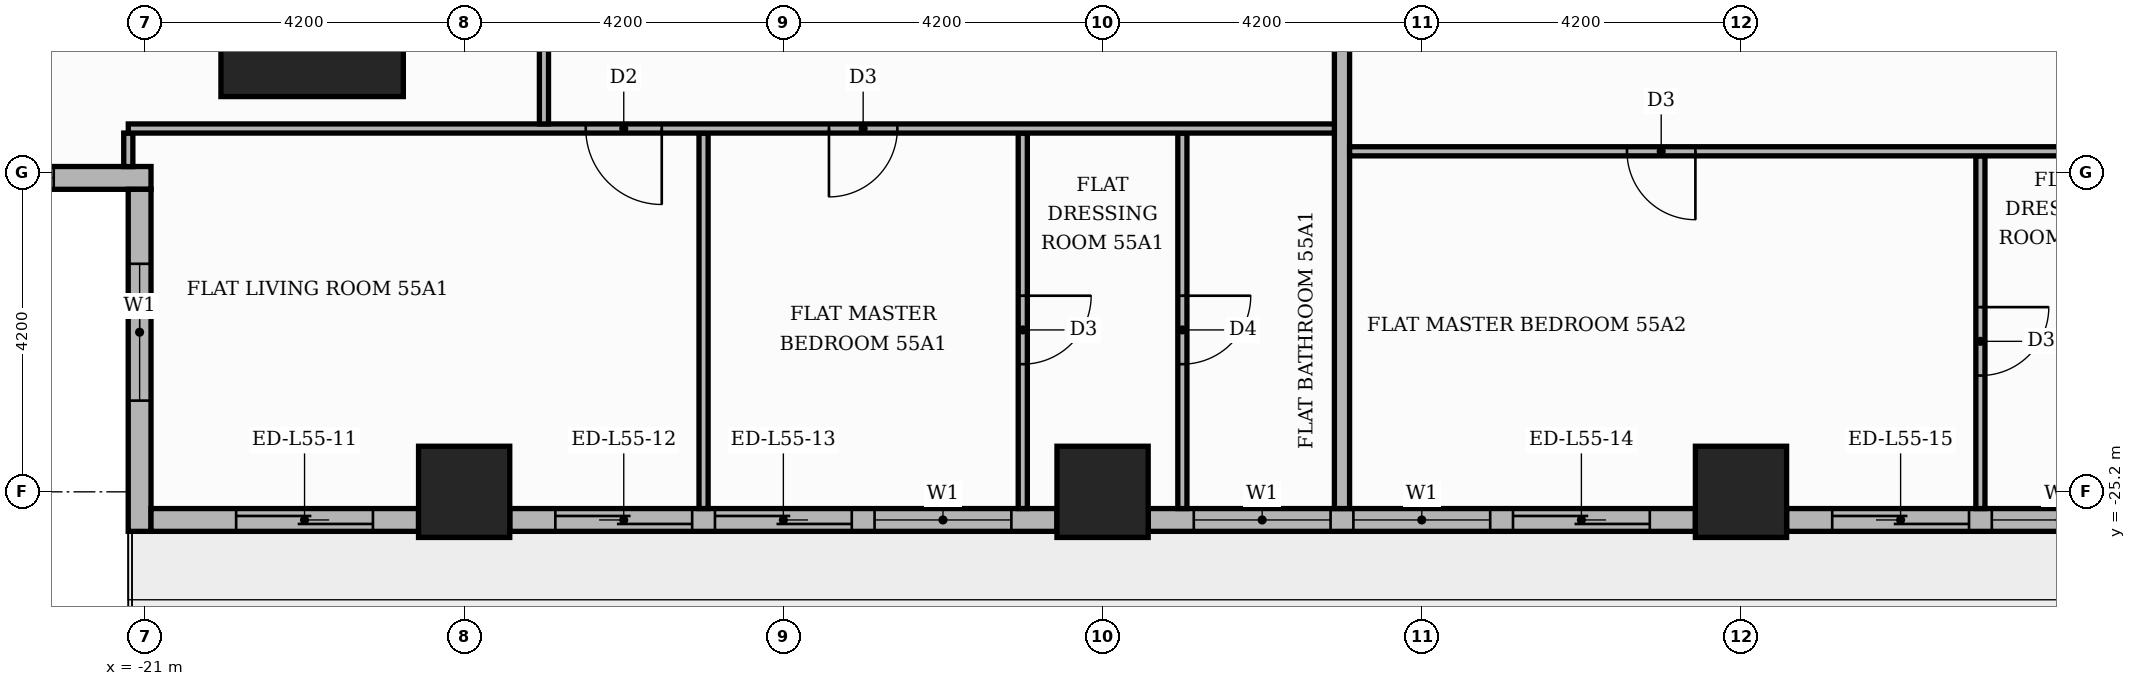
"""IFC4 building model, lengths in metres.
Left out: names, types, materials, properties, quantities, classifications, styles, units other than length and angle.
Written with IfcOpenShell. Run it as: python <this file> out.ifc"""

import sys

from ifc_helpers import new_model, si_unit, direction, frame, frame_2d, origin, origin_2d, place, context, subcontext, project, spatial, rectangle, extrude, element, fill, save


model = new_model("IFC4")
c1 = context("Model", 3, precision=1e-05, world=origin(), true_north=direction((0.0, 1.0)))
c2 = subcontext(c1, "Body", "Model", "MODEL_VIEW")
j1 = project(units=[si_unit("LENGTHUNIT", "METRE"), si_unit("PLANEANGLEUNIT", "RADIAN")], contexts=[c1])
p1 = place(None, origin())
s1 = spatial("IfcSite", under=j1, at=p1, CompositionType="ELEMENT")
p2 = place(p1, origin())
s2 = spatial("IfcBuilding", under=s1, at=p2, CompositionType="ELEMENT")
p3 = place(p2, frame((0.0, 0.0, 231.3)))
s3 = spatial("IfcBuildingStorey", under=s2, at=p3, CompositionType="ELEMENT", Elevation=231.3)
p4 = place(p3, frame((-18.8, -18.8, 0.0), z_axis=(0.0, 0.0, 1.0), x_axis=(1.0, 0.0, 0.0)))
e1 = element("IfcColumn", 1, at=p4, inside=s3, PredefinedType="COLUMN", context=c2, shape_type="SweptSolid", body=[
    extrude(rectangle(XDim=2.4, YDim=2.4, at=origin_2d()), origin(), (0.0, 0.0, 1.0), 3.9),
])
for number, where, z_axis, x_axis in (
    (2, (0.0, -25.2, 0.0), (0.0, 0.0, 1.0), (1.0, 0.0, 0.0)),
    (3, (-8.4, -25.2, 0.0), (0.0, 0.0, 1.0), (1.0, 0.0, 0.0)),
    (4, (-16.8, -25.2, 0.0), (0.0, 0.0, 1.0), (1.0, 0.0, 0.0)),
):
    element("IfcColumn", number, at=place(p3, frame(where, z_axis=z_axis, x_axis=x_axis)), inside=s3, PredefinedType="COLUMN", context=c2, shape_type="SweptSolid", body=[
        extrude(rectangle(XDim=1.2, YDim=1.2, at=origin_2d()), origin(), (0.0, 0.0, 1.0), 3.9),
    ])
p5 = place(p3, frame((-25.42, -21.07, 0.0), z_axis=(0.0, 0.0, 1.0), x_axis=(1.0, 0.0, 0.0)))
e5 = element("IfcWall", 5, at=p5, inside=s3, PredefinedType="STANDARD", context=c2, shape_type="SweptSolid", body=[
    extrude(rectangle(XDim=4.5, YDim=0.3, at=frame_2d((2.25, 0.0))), origin(), (0.0, 0.0, 1.0), 3.4),
])
p6 = place(p5, frame((1.42, 0.0, 0.9)))
e6 = element("IfcOpeningElement", 6, at=p6, cuts=e5, PredefinedType="OPENING", context=c2, shape_type="SweptSolid", body=[
    extrude(rectangle(XDim=1.8, YDim=2.1, at=frame_2d((0.9, 1.05))), frame((0.0, 0.16, 0.0), z_axis=(0.0, -1.0, 0.0), x_axis=(1.0, 0.0, 0.0)), (0.0, 0.0, 1.0), 0.32),
])
p7 = place(p3, frame((-21.07, -21.22, 0.0), z_axis=(0.0, 0.0, 1.0), x_axis=(0.0, -1.0, 0.0)))
e7 = element("IfcWall", 7, at=p7, inside=s3, PredefinedType="STANDARD", context=c2, shape_type="SweptSolid", body=[
    extrude(rectangle(XDim=4.5, YDim=0.3, at=frame_2d((2.25, 0.0))), origin(), (0.0, 0.0, 1.0), 3.4),
])
p8 = place(p7, frame((0.98, 0.0, 0.9)))
e8 = element("IfcOpeningElement", 8, at=p8, cuts=e7, PredefinedType="OPENING", context=c2, shape_type="SweptSolid", body=[
    extrude(rectangle(XDim=1.8, YDim=2.1, at=frame_2d((0.9, 1.05))), frame((0.0, 0.16, 0.0), z_axis=(0.0, -1.0, 0.0), x_axis=(1.0, 0.0, 0.0)), (0.0, 0.0, 1.0), 0.32),
])
p9 = place(p3, frame((-20.92, -25.57, 0.0), z_axis=(0.0, 0.0, 1.0), x_axis=(1.0, 0.0, 0.0)))
e9 = element("IfcWall", 9, at=p9, inside=s3, PredefinedType="STANDARD", context=c2, shape_type="SweptSolid", body=[
    extrude(rectangle(XDim=3.52, YDim=0.3, at=frame_2d((1.76, 0.0))), origin(), (0.0, 0.0, 1.0), 3.4),
])
p10 = place(p9, frame((1.12, 0.0, 0.0)))
e10 = element("IfcOpeningElement", 10, at=p10, cuts=e9, PredefinedType="OPENING", context=c2, shape_type="SweptSolid", body=[
    extrude(rectangle(XDim=1.8, YDim=2.4, at=frame_2d((0.9, 1.2))), frame((0.0, 0.16, 0.0), z_axis=(0.0, -1.0, 0.0), x_axis=(1.0, 0.0, 0.0)), (0.0, 0.0, 1.0), 0.32),
])
p11 = place(p3, frame((-16.2, -25.57, 0.0), z_axis=(0.0, 0.0, 1.0), x_axis=(1.0, 0.0, 0.0)))
e11 = element("IfcWall", 11, at=p11, inside=s3, PredefinedType="STANDARD", context=c2, shape_type="SweptSolid", body=[
    extrude(rectangle(XDim=7.2, YDim=0.3, at=frame_2d((3.6, 0.0))), origin(), (0.0, 0.0, 1.0), 3.4),
])
p12 = place(p11, frame((0.6, 0.0, 0.0)))
e12 = element("IfcOpeningElement", 12, at=p12, cuts=e11, PredefinedType="OPENING", context=c2, shape_type="SweptSolid", body=[
    extrude(rectangle(XDim=1.8, YDim=2.4, at=frame_2d((0.9, 1.2))), frame((0.0, 0.16, 0.0), z_axis=(0.0, -1.0, 0.0), x_axis=(1.0, 0.0, 0.0)), (0.0, 0.0, 1.0), 0.32),
])
p13 = place(p11, frame((2.7, 0.0, 0.0)))
e13 = element("IfcOpeningElement", 13, at=p13, cuts=e11, PredefinedType="OPENING", context=c2, shape_type="SweptSolid", body=[
    extrude(rectangle(XDim=1.8, YDim=2.4, at=frame_2d((0.9, 1.2))), frame((0.0, 0.16, 0.0), z_axis=(0.0, -1.0, 0.0), x_axis=(1.0, 0.0, 0.0)), (0.0, 0.0, 1.0), 0.32),
])
p14 = place(p11, frame((4.8, 0.0, 0.9)))
e14 = element("IfcOpeningElement", 14, at=p14, cuts=e11, PredefinedType="OPENING", context=c2, shape_type="SweptSolid", body=[
    extrude(rectangle(XDim=1.8, YDim=2.1, at=frame_2d((0.9, 1.05))), frame((0.0, 0.16, 0.0), z_axis=(0.0, -1.0, 0.0), x_axis=(1.0, 0.0, 0.0)), (0.0, 0.0, 1.0), 0.32),
])
p15 = place(p3, frame((-7.8, -25.57, 0.0), z_axis=(0.0, 0.0, 1.0), x_axis=(1.0, 0.0, 0.0)))
e15 = element("IfcWall", 15, at=p15, inside=s3, PredefinedType="STANDARD", context=c2, shape_type="SweptSolid", body=[
    extrude(rectangle(XDim=7.2, YDim=0.3, at=frame_2d((3.6, 0.0))), origin(), (0.0, 0.0, 1.0), 3.4),
])
p16 = place(p15, frame((0.6, 0.0, 0.9)))
e16 = element("IfcOpeningElement", 16, at=p16, cuts=e15, PredefinedType="OPENING", context=c2, shape_type="SweptSolid", body=[
    extrude(rectangle(XDim=1.8, YDim=2.1, at=frame_2d((0.9, 1.05))), frame((0.0, 0.16, 0.0), z_axis=(0.0, -1.0, 0.0), x_axis=(1.0, 0.0, 0.0)), (0.0, 0.0, 1.0), 0.32),
])
p17 = place(p15, frame((2.7, 0.0, 0.9)))
e17 = element("IfcOpeningElement", 17, at=p17, cuts=e15, PredefinedType="OPENING", context=c2, shape_type="SweptSolid", body=[
    extrude(rectangle(XDim=1.8, YDim=2.1, at=frame_2d((0.9, 1.05))), frame((0.0, 0.16, 0.0), z_axis=(0.0, -1.0, 0.0), x_axis=(1.0, 0.0, 0.0)), (0.0, 0.0, 1.0), 0.32),
])
p18 = place(p15, frame((4.8, 0.0, 0.0)))
e18 = element("IfcOpeningElement", 18, at=p18, cuts=e15, PredefinedType="OPENING", context=c2, shape_type="SweptSolid", body=[
    extrude(rectangle(XDim=1.8, YDim=2.4, at=frame_2d((0.9, 1.2))), frame((0.0, 0.16, 0.0), z_axis=(0.0, -1.0, 0.0), x_axis=(1.0, 0.0, 0.0)), (0.0, 0.0, 1.0), 0.32),
])
p19 = place(p3, frame((0.6, -25.57, 0.0), z_axis=(0.0, 0.0, 1.0), x_axis=(1.0, 0.0, 0.0)))
e19 = element("IfcWall", 19, at=p19, inside=s3, PredefinedType="STANDARD", context=c2, shape_type="SweptSolid", body=[
    extrude(rectangle(XDim=7.2, YDim=0.3, at=frame_2d((3.6, 0.0))), origin(), (0.0, 0.0, 1.0), 3.4),
])
p20 = place(p19, frame((0.6, 0.0, 0.0)))
e20 = element("IfcOpeningElement", 20, at=p20, cuts=e19, PredefinedType="OPENING", context=c2, shape_type="SweptSolid", body=[
    extrude(rectangle(XDim=1.8, YDim=2.4, at=frame_2d((0.9, 1.2))), frame((0.0, 0.16, 0.0), z_axis=(0.0, -1.0, 0.0), x_axis=(1.0, 0.0, 0.0)), (0.0, 0.0, 1.0), 0.32),
])
p21 = place(p19, frame((2.7, 0.0, 0.9)))
e21 = element("IfcOpeningElement", 21, at=p21, cuts=e19, PredefinedType="OPENING", context=c2, shape_type="SweptSolid", body=[
    extrude(rectangle(XDim=1.8, YDim=2.1, at=frame_2d((0.9, 1.05))), frame((0.0, 0.16, 0.0), z_axis=(0.0, -1.0, 0.0), x_axis=(1.0, 0.0, 0.0)), (0.0, 0.0, 1.0), 0.32),
])
p22 = place(p19, frame((4.8, 0.0, 0.9)))
e22 = element("IfcOpeningElement", 22, at=p22, cuts=e19, PredefinedType="OPENING", context=c2, shape_type="SweptSolid", body=[
    extrude(rectangle(XDim=1.8, YDim=2.1, at=frame_2d((0.9, 1.05))), frame((0.0, 0.16, 0.0), z_axis=(0.0, -1.0, 0.0), x_axis=(1.0, 0.0, 0.0)), (0.0, 0.0, 1.0), 0.32),
])
p23 = place(p3, frame((-13.65, -25.42, 0.0), z_axis=(0.0, 0.0, 1.0), x_axis=(0.0, 1.0, 0.0)))
e23 = element("IfcWall", 23, at=p23, inside=s3, PredefinedType="PARTITIONING", context=c2, shape_type="SweptSolid", body=[
    extrude(rectangle(XDim=4.94, YDim=0.12, at=frame_2d((2.47, 0.0))), origin(), (0.0, 0.0, 1.0), 3.4),
])
p24 = place(p3, frame((-9.45, -25.42, 0.0), z_axis=(0.0, 0.0, 1.0), x_axis=(0.0, 1.0, 0.0)))
e24 = element("IfcWall", 24, at=p24, inside=s3, PredefinedType="PARTITIONING", context=c2, shape_type="SweptSolid", body=[
    extrude(rectangle(XDim=4.94, YDim=0.12, at=frame_2d((2.47, 0.0))), origin(), (0.0, 0.0, 1.0), 3.4),
])
p25 = place(p24, frame((1.9, 0.0, 0.0)))
e25 = element("IfcOpeningElement", 25, at=p25, cuts=e24, PredefinedType="OPENING", context=c2, shape_type="SweptSolid", body=[
    extrude(rectangle(XDim=0.9, YDim=2.1, at=frame_2d((0.45, 1.05))), frame((0.0, 0.07, 0.0), z_axis=(0.0, -1.0, 0.0), x_axis=(1.0, 0.0, 0.0)), (0.0, 0.0, 1.0), 0.14),
])
p26 = place(p3, frame((-7.35, -25.42, 0.0), z_axis=(0.0, 0.0, 1.0), x_axis=(0.0, 1.0, 0.0)))
e26 = element("IfcWall", 26, at=p26, inside=s3, PredefinedType="PARTITIONING", context=c2, shape_type="SweptSolid", body=[
    extrude(rectangle(XDim=4.94, YDim=0.12, at=frame_2d((2.47, 0.0))), origin(), (0.0, 0.0, 1.0), 3.4),
])
p27 = place(p26, frame((1.9, 0.0, 0.0)))
e27 = element("IfcOpeningElement", 27, at=p27, cuts=e26, PredefinedType="OPENING", context=c2, shape_type="SweptSolid", body=[
    extrude(rectangle(XDim=0.9, YDim=2.1, at=frame_2d((0.45, 1.05))), frame((0.0, 0.07, 0.0), z_axis=(0.0, -1.0, 0.0), x_axis=(1.0, 0.0, 0.0)), (0.0, 0.0, 1.0), 0.14),
])
p28 = place(p3, frame((-5.25, -25.42, 0.0), z_axis=(0.0, 0.0, 1.0), x_axis=(0.0, 1.0, 0.0)))
e28 = element("IfcWall", 28, at=p28, inside=s3, PredefinedType="PARTITIONING", context=c2, shape_type="SweptSolid", body=[
    extrude(rectangle(XDim=11.67, YDim=0.2, at=frame_2d((5.835, 0.0))), origin(), (0.0, 0.0, 1.0), 3.4),
])
p29 = place(p3, frame((3.15, -25.42, 0.0), z_axis=(0.0, 0.0, 1.0), x_axis=(0.0, 1.0, 0.0)))
e29 = element("IfcWall", 29, at=p29, inside=s3, PredefinedType="PARTITIONING", context=c2, shape_type="SweptSolid", body=[
    extrude(rectangle(XDim=4.64, YDim=0.12, at=frame_2d((2.32, 0.0))), origin(), (0.0, 0.0, 1.0), 3.4),
])
p30 = place(p29, frame((1.75, 0.0, 0.0)))
e30 = element("IfcOpeningElement", 30, at=p30, cuts=e29, PredefinedType="OPENING", context=c2, shape_type="SweptSolid", body=[
    extrude(rectangle(XDim=0.9, YDim=2.1, at=frame_2d((0.45, 1.05))), frame((0.0, 0.07, 0.0), z_axis=(0.0, -1.0, 0.0), x_axis=(1.0, 0.0, 0.0)), (0.0, 0.0, 1.0), 0.14),
])
p31 = place(p3, frame((-21.219, -20.921, 0.0), z_axis=(0.0, 0.0, 1.0), x_axis=(0.0, 1.0, 0.0)))
e31 = element("IfcWall", 31, at=p31, inside=s3, PredefinedType="PARTITIONING", context=c2, shape_type="SweptSolid", body=[
    extrude(rectangle(XDim=0.441, YDim=0.12, at=frame_2d((0.22, 0.0))), origin(), (0.0, 0.0, 1.0), 3.4),
])
p32 = place(p3, frame((-5.15, -20.72, 0.0), z_axis=(0.0, 0.0, 1.0), x_axis=(1.0, 0.0, 0.0)))
e32 = element("IfcWall", 32, at=p32, inside=s3, PredefinedType="PARTITIONING", context=c2, shape_type="SweptSolid", body=[
    extrude(rectangle(XDim=18.7, YDim=0.12, at=frame_2d((9.35, 0.0))), origin(), (0.0, 0.0, 1.0), 3.4),
])
p33 = place(p32, frame((3.65, 0.0, 0.0)))
e33 = element("IfcOpeningElement", 33, at=p33, cuts=e32, PredefinedType="OPENING", context=c2, shape_type="SweptSolid", body=[
    extrude(rectangle(XDim=0.9, YDim=2.1, at=frame_2d((0.45, 1.05))), frame((0.0, 0.07, 0.0), z_axis=(0.0, -1.0, 0.0), x_axis=(1.0, 0.0, 0.0)), (0.0, 0.0, 1.0), 0.14),
])
p34 = place(p32, frame((15.15, 0.0, 0.0)))
e34 = element("IfcOpeningElement", 34, at=p34, cuts=e32, PredefinedType="OPENING", context=c2, shape_type="SweptSolid", body=[
    extrude(rectangle(XDim=1.0, YDim=2.1, at=frame_2d((0.5, 1.05))), frame((0.0, 0.07, 0.0), z_axis=(0.0, -1.0, 0.0), x_axis=(1.0, 0.0, 0.0)), (0.0, 0.0, 1.0), 0.14),
])
p35 = place(p3, frame((-21.219, -20.42, 0.0), z_axis=(0.0, 0.0, 1.0), x_axis=(1.0, 0.0, 0.0)))
e35 = element("IfcWall", 35, at=p35, inside=s3, PredefinedType="PARTITIONING", context=c2, shape_type="SweptSolid", body=[
    extrude(rectangle(XDim=15.869, YDim=0.12, at=frame_2d((7.935, 0.0))), origin(), (0.0, 0.0, 1.0), 3.4),
])
p36 = place(p35, frame((6.019, 0.0, 0.0)))
e36 = element("IfcOpeningElement", 36, at=p36, cuts=e35, PredefinedType="OPENING", context=c2, shape_type="SweptSolid", body=[
    extrude(rectangle(XDim=1.0, YDim=2.1, at=frame_2d((0.5, 1.05))), frame((0.0, 0.07, 0.0), z_axis=(0.0, -1.0, 0.0), x_axis=(1.0, 0.0, 0.0)), (0.0, 0.0, 1.0), 0.14),
])
p37 = place(p35, frame((9.219, 0.0, 0.0)))
e37 = element("IfcOpeningElement", 37, at=p37, cuts=e35, PredefinedType="OPENING", context=c2, shape_type="SweptSolid", body=[
    extrude(rectangle(XDim=0.9, YDim=2.1, at=frame_2d((0.45, 1.05))), frame((0.0, 0.07, 0.0), z_axis=(0.0, -1.0, 0.0), x_axis=(1.0, 0.0, 0.0)), (0.0, 0.0, 1.0), 0.14),
])
p38 = place(p3, frame((-15.75, -20.36, 0.0), z_axis=(0.0, 0.0, 1.0), x_axis=(0.0, 1.0, 0.0)))
e38 = element("IfcWall", 38, at=p38, inside=s3, PredefinedType="PARTITIONING", context=c2, shape_type="SweptSolid", body=[
    extrude(rectangle(XDim=6.61, YDim=0.12, at=frame_2d((3.305, 0.0))), origin(), (0.0, 0.0, 1.0), 3.4),
])
p39 = place(p38, frame((2.825, 0.0, 0.0)))
e39 = element("IfcOpeningElement", 39, at=p39, cuts=e38, PredefinedType="OPENING", context=c2, shape_type="SweptSolid", body=[
    extrude(rectangle(XDim=1.0, YDim=2.1, at=frame_2d((0.5, 1.05))), frame((0.0, 0.07, 0.0), z_axis=(0.0, -1.0, 0.0), x_axis=(1.0, 0.0, 0.0)), (0.0, 0.0, 1.0), 0.14),
])
p40 = place(p6, origin())
e40 = element("IfcWindow", 40, at=p40, inside=s3, PartitioningType="SINGLE_PANEL", PredefinedType="WINDOW", context=c2, shape_type="SweptSolid", body=[
    extrude(rectangle(XDim=1.8, YDim=2.1, at=frame_2d((0.9, 1.05))), frame((0.0, 0.03, 0.0), z_axis=(0.0, -1.0, 0.0), x_axis=(1.0, 0.0, 0.0)), (0.0, 0.0, 1.0), 0.06),
])
fill(e6, e40)
p41 = place(p8, origin())
e41 = element("IfcWindow", 41, at=p41, inside=s3, PartitioningType="SINGLE_PANEL", PredefinedType="WINDOW", context=c2, shape_type="SweptSolid", body=[
    extrude(rectangle(XDim=1.8, YDim=2.1, at=frame_2d((0.9, 1.05))), frame((0.0, 0.03, 0.0), z_axis=(0.0, -1.0, 0.0), x_axis=(1.0, 0.0, 0.0)), (0.0, 0.0, 1.0), 0.06),
])
fill(e8, e41)
p42 = place(p10, origin())
e42 = element("IfcDoor", 42, at=p42, inside=s3, OperationType="SLIDING_TO_RIGHT", PredefinedType="DOOR", context=c2, shape_type="SweptSolid", body=[
    extrude(rectangle(XDim=1.8, YDim=2.4, at=frame_2d((0.9, 1.2))), frame((0.0, 0.025, 0.0), z_axis=(0.0, -1.0, 0.0), x_axis=(1.0, 0.0, 0.0)), (0.0, 0.0, 1.0), 0.05),
])
fill(e10, e42)
p43 = place(p12, origin())
e43 = element("IfcDoor", 43, at=p43, inside=s3, OperationType="SLIDING_TO_LEFT", PredefinedType="DOOR", context=c2, shape_type="SweptSolid", body=[
    extrude(rectangle(XDim=1.8, YDim=2.4, at=frame_2d((0.9, 1.2))), frame((0.0, 0.025, 0.0), z_axis=(0.0, -1.0, 0.0), x_axis=(1.0, 0.0, 0.0)), (0.0, 0.0, 1.0), 0.05),
])
fill(e12, e43)
p44 = place(p13, origin())
e44 = element("IfcDoor", 44, at=p44, inside=s3, OperationType="SLIDING_TO_RIGHT", PredefinedType="DOOR", context=c2, shape_type="SweptSolid", body=[
    extrude(rectangle(XDim=1.8, YDim=2.4, at=frame_2d((0.9, 1.2))), frame((0.0, 0.025, 0.0), z_axis=(0.0, -1.0, 0.0), x_axis=(1.0, 0.0, 0.0)), (0.0, 0.0, 1.0), 0.05),
])
fill(e13, e44)
p45 = place(p14, origin())
e45 = element("IfcWindow", 45, at=p45, inside=s3, PartitioningType="SINGLE_PANEL", PredefinedType="WINDOW", context=c2, shape_type="SweptSolid", body=[
    extrude(rectangle(XDim=1.8, YDim=2.1, at=frame_2d((0.9, 1.05))), frame((0.0, 0.03, 0.0), z_axis=(0.0, -1.0, 0.0), x_axis=(1.0, 0.0, 0.0)), (0.0, 0.0, 1.0), 0.06),
])
fill(e14, e45)
p46 = place(p16, origin())
e46 = element("IfcWindow", 46, at=p46, inside=s3, PartitioningType="SINGLE_PANEL", PredefinedType="WINDOW", context=c2, shape_type="SweptSolid", body=[
    extrude(rectangle(XDim=1.8, YDim=2.1, at=frame_2d((0.9, 1.05))), frame((0.0, 0.03, 0.0), z_axis=(0.0, -1.0, 0.0), x_axis=(1.0, 0.0, 0.0)), (0.0, 0.0, 1.0), 0.06),
])
fill(e16, e46)
p47 = place(p17, origin())
e47 = element("IfcWindow", 47, at=p47, inside=s3, PartitioningType="SINGLE_PANEL", PredefinedType="WINDOW", context=c2, shape_type="SweptSolid", body=[
    extrude(rectangle(XDim=1.8, YDim=2.1, at=frame_2d((0.9, 1.05))), frame((0.0, 0.03, 0.0), z_axis=(0.0, -1.0, 0.0), x_axis=(1.0, 0.0, 0.0)), (0.0, 0.0, 1.0), 0.06),
])
fill(e17, e47)
p48 = place(p18, origin())
e48 = element("IfcDoor", 48, at=p48, inside=s3, OperationType="SLIDING_TO_RIGHT", PredefinedType="DOOR", context=c2, shape_type="SweptSolid", body=[
    extrude(rectangle(XDim=1.8, YDim=2.4, at=frame_2d((0.9, 1.2))), frame((0.0, 0.025, 0.0), z_axis=(0.0, -1.0, 0.0), x_axis=(1.0, 0.0, 0.0)), (0.0, 0.0, 1.0), 0.05),
])
fill(e18, e48)
p49 = place(p20, origin())
e49 = element("IfcDoor", 49, at=p49, inside=s3, OperationType="SLIDING_TO_LEFT", PredefinedType="DOOR", context=c2, shape_type="SweptSolid", body=[
    extrude(rectangle(XDim=1.8, YDim=2.4, at=frame_2d((0.9, 1.2))), frame((0.0, 0.025, 0.0), z_axis=(0.0, -1.0, 0.0), x_axis=(1.0, 0.0, 0.0)), (0.0, 0.0, 1.0), 0.05),
])
fill(e20, e49)
p50 = place(p21, origin())
e50 = element("IfcWindow", 50, at=p50, inside=s3, PartitioningType="SINGLE_PANEL", PredefinedType="WINDOW", context=c2, shape_type="SweptSolid", body=[
    extrude(rectangle(XDim=1.8, YDim=2.1, at=frame_2d((0.9, 1.05))), frame((0.0, 0.03, 0.0), z_axis=(0.0, -1.0, 0.0), x_axis=(1.0, 0.0, 0.0)), (0.0, 0.0, 1.0), 0.06),
])
fill(e21, e50)
p51 = place(p36, frame((1.0, 0.0, 0.0), z_axis=(0.0, 0.0, 1.0), x_axis=(-1.0, 0.0, 0.0)))
e51 = element("IfcDoor", 51, at=p51, inside=s3, OperationType="SINGLE_SWING_RIGHT", PredefinedType="DOOR", context=c2, shape_type="SweptSolid", body=[
    extrude(rectangle(XDim=1.0, YDim=2.1, at=frame_2d((0.5, 1.05))), frame((0.0, 0.025, 0.0), z_axis=(0.0, -1.0, 0.0), x_axis=(1.0, 0.0, 0.0)), (0.0, 0.0, 1.0), 0.05),
])
fill(e36, e51)
p52 = place(p37, frame((0.9, 0.0, 0.0), z_axis=(0.0, 0.0, 1.0), x_axis=(-1.0, 0.0, 0.0)))
e52 = element("IfcDoor", 52, at=p52, inside=s3, OperationType="SINGLE_SWING_LEFT", PredefinedType="DOOR", context=c2, shape_type="SweptSolid", body=[
    extrude(rectangle(XDim=0.9, YDim=2.1, at=frame_2d((0.45, 1.05))), frame((0.0, 0.025, 0.0), z_axis=(0.0, -1.0, 0.0), x_axis=(1.0, 0.0, 0.0)), (0.0, 0.0, 1.0), 0.05),
])
fill(e37, e52)
p53 = place(p25, frame((0.9, 0.0, 0.0), z_axis=(0.0, 0.0, 1.0), x_axis=(-1.0, 0.0, 0.0)))
e53 = element("IfcDoor", 53, at=p53, inside=s3, OperationType="SINGLE_SWING_RIGHT", PredefinedType="DOOR", context=c2, shape_type="SweptSolid", body=[
    extrude(rectangle(XDim=0.9, YDim=2.1, at=frame_2d((0.45, 1.05))), frame((0.0, 0.025, 0.0), z_axis=(0.0, -1.0, 0.0), x_axis=(1.0, 0.0, 0.0)), (0.0, 0.0, 1.0), 0.05),
])
fill(e25, e53)
p54 = place(p27, frame((0.9, 0.0, 0.0), z_axis=(0.0, 0.0, 1.0), x_axis=(-1.0, 0.0, 0.0)))
e54 = element("IfcDoor", 54, at=p54, inside=s3, OperationType="SINGLE_SWING_RIGHT", PredefinedType="DOOR", context=c2, shape_type="SweptSolid", body=[
    extrude(rectangle(XDim=0.9, YDim=2.1, at=frame_2d((0.45, 1.05))), frame((0.0, 0.025, 0.0), z_axis=(0.0, -1.0, 0.0), x_axis=(1.0, 0.0, 0.0)), (0.0, 0.0, 1.0), 0.05),
])
fill(e27, e54)
p55 = place(p33, frame((0.9, 0.0, 0.0), z_axis=(0.0, 0.0, 1.0), x_axis=(-1.0, 0.0, 0.0)))
e55 = element("IfcDoor", 55, at=p55, inside=s3, OperationType="SINGLE_SWING_RIGHT", PredefinedType="DOOR", context=c2, shape_type="SweptSolid", body=[
    extrude(rectangle(XDim=0.9, YDim=2.1, at=frame_2d((0.45, 1.05))), frame((0.0, 0.025, 0.0), z_axis=(0.0, -1.0, 0.0), x_axis=(1.0, 0.0, 0.0)), (0.0, 0.0, 1.0), 0.05),
])
fill(e33, e55)
p56 = place(p30, frame((0.9, 0.0, 0.0), z_axis=(0.0, 0.0, 1.0), x_axis=(-1.0, 0.0, 0.0)))
e56 = element("IfcDoor", 56, at=p56, inside=s3, OperationType="SINGLE_SWING_RIGHT", PredefinedType="DOOR", context=c2, shape_type="SweptSolid", body=[
    extrude(rectangle(XDim=0.9, YDim=2.1, at=frame_2d((0.45, 1.05))), frame((0.0, 0.025, 0.0), z_axis=(0.0, -1.0, 0.0), x_axis=(1.0, 0.0, 0.0)), (0.0, 0.0, 1.0), 0.05),
])
fill(e30, e56)
save(model, sys.argv[1])
